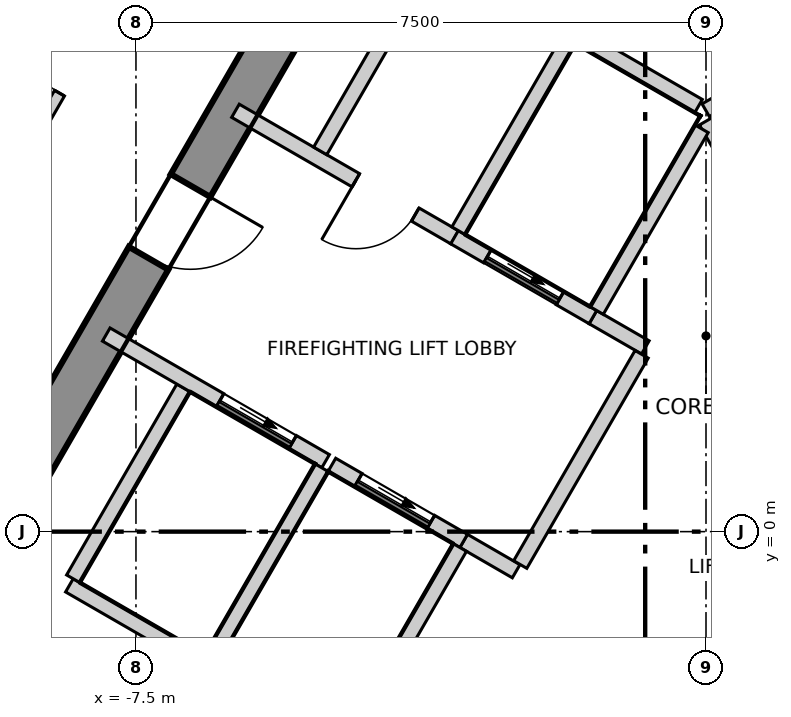
"""IFC4 building model, lengths in metres.
Left out: names, types, materials, properties, quantities, classifications, styles, units other than length and angle.
Written with IfcOpenShell. Run it as: python <this file> out.ifc"""

import sys

from ifc_helpers import new_model, si_unit, direction, frame, frame_2d, origin, place, context, subcontext, project, spatial, polyline, rectangle, outline, extrude, element, fill, save


model = new_model("IFC4")
c1 = context("Model", 3, precision=1e-05, world=origin(), true_north=direction((0.0, 1.0)))
c2 = subcontext(c1, "Body", "Model", "MODEL_VIEW")
j1 = project(units=[si_unit("LENGTHUNIT", "METRE"), si_unit("PLANEANGLEUNIT", "RADIAN")], contexts=[c1])
p1 = place(None, origin())
s1 = spatial("IfcSite", under=j1, at=p1, CompositionType="ELEMENT")
p2 = place(p1, origin())
s2 = spatial("IfcBuilding", under=s1, at=p2, CompositionType="ELEMENT")
p3 = place(p2, frame((0.0, 0.0, 289.9)))
s3 = spatial("IfcBuildingStorey", under=s2, at=p3, CompositionType="ELEMENT", Elevation=289.9)
p4 = place(p3, frame((-1.732, 13.3, -0.3), z_axis=(0.0, 0.0, 1.0), x_axis=(-0.500000539815, -0.866025092122, 0.0)))
e1 = element("IfcWall", 1, at=p4, inside=s3, PredefinedType="SHEAR", context=c2, shape_type="SweptSolid", body=[
    extrude(outline(polyline([(-0.173, -0.3), (1.795, -0.3), (3.763, -0.3), (5.732, -0.3), (7.7, -0.3), (9.668, -0.301), (11.637, -0.301), (13.605, -0.301), (15.573, -0.301), (17.542, -0.301), (19.51, -0.301), (21.478, -0.301), (21.131, 0.3), (19.226, 0.3), (17.321, 0.3), (15.415, 0.3), (13.51, 0.3), (11.605, 0.3), (9.699, 0.3), (7.794, 0.3), (5.889, 0.3), (3.984, 0.3), (2.078, 0.3), (0.173, 0.3), (-0.173, -0.3)])), origin(), (0.0, 0.0, 1.0), 3.6),
])
p5 = place(p4, frame((10.102, 0.0, 0.3)))
e2 = element("IfcOpeningElement", 2, at=p5, cuts=e1, PredefinedType="OPENING", context=c2, shape_type="SweptSolid", body=[
    extrude(rectangle(XDim=1.1, YDim=2.1, at=frame_2d((0.55, 1.05))), frame((0.0, 0.31, 0.0), z_axis=(0.0, -1.0, 0.0), x_axis=(1.0, 0.0, 0.0)), (0.0, 0.0, 1.0), 0.621),
])
p6 = place(p4, frame((16.328, 0.0, 0.3)))
e3 = element("IfcOpeningElement", 3, at=p6, cuts=e1, PredefinedType="OPENING", context=c2, shape_type="SweptSolid", body=[
    extrude(rectangle(XDim=1.0, YDim=2.1, at=frame_2d((0.5, 1.05))), frame((0.0, 0.31, 0.0), z_axis=(0.0, -1.0, 0.0), x_axis=(1.0, 0.0, 0.0)), (0.0, 0.0, 1.0), 0.621),
])
p7 = place(p4, frame((4.777, 0.0, 0.3)))
e4 = element("IfcOpeningElement", 4, at=p7, cuts=e1, PredefinedType="OPENING", context=c2, shape_type="SweptSolid", body=[
    extrude(rectangle(XDim=0.9, YDim=2.1, at=frame_2d((0.45, 1.05))), frame((0.0, 0.31, 0.0), z_axis=(0.0, -1.0, 0.0), x_axis=(1.0, 0.0, 0.0)), (0.0, 0.0, 1.0), 0.621),
])
p8 = place(p3, frame((-2.494, 27.86, 0.0), z_axis=(0.0, 0.0, 1.0), x_axis=(-0.500008134474, -0.866020707292, 0.0)))
e5 = element("IfcWall", 5, at=p8, inside=s3, PredefinedType="ELEMENTEDWALL", context=c2, shape_type="SweptSolid", body=[
    extrude(rectangle(XDim=45.741, YDim=0.2, at=frame_2d((22.871, 0.0))), origin(), (0.0, 0.0, 1.0), 3.3),
])
p9 = place(p8, frame((2.15, 0.0, 0.9)))
e6 = element("IfcOpeningElement", 6, at=p9, cuts=e5, PredefinedType="OPENING", context=c2, shape_type="SweptSolid", body=[
    extrude(rectangle(XDim=3.7, YDim=2.2, at=frame_2d((1.85, 1.1))), frame((0.0, 0.11, 0.0), z_axis=(0.0, -1.0, 0.0), x_axis=(1.0, 0.0, 0.0)), (0.0, 0.0, 1.0), 0.22),
])
p10 = place(p8, frame((7.544, 0.0, 0.9)))
e7 = element("IfcOpeningElement", 7, at=p10, cuts=e5, PredefinedType="OPENING", context=c2, shape_type="SweptSolid", body=[
    extrude(rectangle(XDim=3.7, YDim=2.2, at=frame_2d((1.85, 1.1))), frame((0.0, 0.11, 0.0), z_axis=(0.0, -1.0, 0.0), x_axis=(1.0, 0.0, 0.0)), (0.0, 0.0, 1.0), 0.22),
])
p11 = place(p8, frame((12.939, 0.0, 0.9)))
e8 = element("IfcOpeningElement", 8, at=p11, cuts=e5, PredefinedType="OPENING", context=c2, shape_type="SweptSolid", body=[
    extrude(rectangle(XDim=3.7, YDim=2.2, at=frame_2d((1.85, 1.1))), frame((0.0, 0.11, 0.0), z_axis=(0.0, -1.0, 0.0), x_axis=(1.0, 0.0, 0.0)), (0.0, 0.0, 1.0), 0.22),
])
p12 = place(p8, frame((18.333, 0.0, 0.9)))
e9 = element("IfcOpeningElement", 9, at=p12, cuts=e5, PredefinedType="OPENING", context=c2, shape_type="SweptSolid", body=[
    extrude(rectangle(XDim=3.7, YDim=2.2, at=frame_2d((1.85, 1.1))), frame((0.0, 0.11, 0.0), z_axis=(0.0, -1.0, 0.0), x_axis=(1.0, 0.0, 0.0)), (0.0, 0.0, 1.0), 0.22),
])
p13 = place(p8, frame((23.728, 0.0, 0.9)))
e10 = element("IfcOpeningElement", 10, at=p13, cuts=e5, PredefinedType="OPENING", context=c2, shape_type="SweptSolid", body=[
    extrude(rectangle(XDim=3.7, YDim=2.2, at=frame_2d((1.85, 1.1))), frame((0.0, 0.11, 0.0), z_axis=(0.0, -1.0, 0.0), x_axis=(1.0, 0.0, 0.0)), (0.0, 0.0, 1.0), 0.22),
])
p14 = place(p8, frame((29.122, 0.0, 0.9)))
e11 = element("IfcOpeningElement", 11, at=p14, cuts=e5, PredefinedType="OPENING", context=c2, shape_type="SweptSolid", body=[
    extrude(rectangle(XDim=3.7, YDim=2.2, at=frame_2d((1.85, 1.1))), frame((0.0, 0.11, 0.0), z_axis=(0.0, -1.0, 0.0), x_axis=(1.0, 0.0, 0.0)), (0.0, 0.0, 1.0), 0.22),
])
p15 = place(p8, frame((34.517, 0.0, 0.9)))
e12 = element("IfcOpeningElement", 12, at=p15, cuts=e5, PredefinedType="OPENING", context=c2, shape_type="SweptSolid", body=[
    extrude(rectangle(XDim=3.7, YDim=2.2, at=frame_2d((1.85, 1.1))), frame((0.0, 0.11, 0.0), z_axis=(0.0, -1.0, 0.0), x_axis=(1.0, 0.0, 0.0)), (0.0, 0.0, 1.0), 0.22),
])
p16 = place(p8, frame((39.911, 0.0, 0.9)))
e13 = element("IfcOpeningElement", 13, at=p16, cuts=e5, PredefinedType="OPENING", context=c2, shape_type="SweptSolid", body=[
    extrude(rectangle(XDim=3.7, YDim=2.2, at=frame_2d((1.85, 1.1))), frame((0.0, 0.11, 0.0), z_axis=(0.0, -1.0, 0.0), x_axis=(1.0, 0.0, 0.0)), (0.0, 0.0, 1.0), 0.22),
])
p17 = place(p3, frame((-17.679, -10.12, 0.0), z_axis=(0.0, 0.0, 1.0), x_axis=(0.500008955215, 0.866020233427, 0.0)))
e14 = element("IfcWall", 14, at=p17, inside=s3, PredefinedType="PARTITIONING", context=c2, shape_type="SweptSolid", body=[
    extrude(rectangle(XDim=35.357, YDim=0.15, at=frame_2d((17.679, 0.0))), origin(), (0.0, 0.0, 1.0), 3.3),
])
p18 = place(p17, frame((31.407, 0.0, 0.0)))
e15 = element("IfcOpeningElement", 15, at=p18, cuts=e14, PredefinedType="OPENING", context=c2, shape_type="SweptSolid", body=[
    extrude(rectangle(XDim=1.0, YDim=2.1, at=frame_2d((0.5, 1.05))), frame((0.0, 0.085, 0.0), z_axis=(0.0, -1.0, 0.0), x_axis=(1.0, 0.0, 0.0)), (0.0, 0.0, 1.0), 0.17),
])
p19 = place(p17, frame((25.642, 0.0, 0.0)))
e16 = element("IfcOpeningElement", 16, at=p19, cuts=e14, PredefinedType="OPENING", context=c2, shape_type="SweptSolid", body=[
    extrude(rectangle(XDim=1.0, YDim=2.1, at=frame_2d((0.5, 1.05))), frame((0.0, 0.085, 0.0), z_axis=(0.0, -1.0, 0.0), x_axis=(1.0, 0.0, 0.0)), (0.0, 0.0, 1.0), 0.17),
])
p20 = place(p17, frame((18.348, 0.0, 0.0)))
e17 = element("IfcOpeningElement", 17, at=p20, cuts=e14, PredefinedType="OPENING", context=c2, shape_type="SweptSolid", body=[
    extrude(rectangle(XDim=1.0, YDim=2.1, at=frame_2d((0.5, 1.05))), frame((0.0, 0.085, 0.0), z_axis=(0.0, -1.0, 0.0), x_axis=(1.0, 0.0, 0.0)), (0.0, 0.0, 1.0), 0.17),
])
p21 = place(p17, frame((13.254, 0.0, 0.0)))
e18 = element("IfcOpeningElement", 18, at=p21, cuts=e14, PredefinedType="OPENING", context=c2, shape_type="SweptSolid", body=[
    extrude(rectangle(XDim=1.0, YDim=2.1, at=frame_2d((0.5, 1.05))), frame((0.0, 0.085, 0.0), z_axis=(0.0, -1.0, 0.0), x_axis=(1.0, 0.0, 0.0)), (0.0, 0.0, 1.0), 0.17),
])
p22 = place(p17, frame((7.559, 0.0, 0.0)))
e19 = element("IfcOpeningElement", 19, at=p22, cuts=e14, PredefinedType="OPENING", context=c2, shape_type="SweptSolid", body=[
    extrude(rectangle(XDim=1.0, YDim=2.1, at=frame_2d((0.5, 1.05))), frame((0.0, 0.085, 0.0), z_axis=(0.0, -1.0, 0.0), x_axis=(1.0, 0.0, 0.0)), (0.0, 0.0, 1.0), 0.17),
])
p23 = place(p17, frame((2.865, 0.0, 0.0)))
e20 = element("IfcOpeningElement", 20, at=p23, cuts=e14, PredefinedType="OPENING", context=c2, shape_type="SweptSolid", body=[
    extrude(rectangle(XDim=1.0, YDim=2.1, at=frame_2d((0.5, 1.05))), frame((0.0, 0.085, 0.0), z_axis=(0.0, -1.0, 0.0), x_axis=(1.0, 0.0, 0.0)), (0.0, 0.0, 1.0), 0.17),
])
p24 = place(p3, frame((0.075, 20.37, 0.0), z_axis=(0.0, 0.0, 1.0), x_axis=(0.500009775255, -0.866019759965, 0.0)))
e21 = element("IfcWall", 21, at=p24, inside=s3, PredefinedType="PARTITIONING", context=c2, shape_type="SweptSolid", body=[
    extrude(rectangle(XDim=35.207, YDim=0.15, at=frame_2d((17.604, 0.0))), origin(), (0.0, 0.0, 1.0), 3.3),
])
p25 = place(p24, frame((31.407, 0.0, 0.0)))
e22 = element("IfcOpeningElement", 22, at=p25, cuts=e21, PredefinedType="OPENING", context=c2, shape_type="SweptSolid", body=[
    extrude(rectangle(XDim=1.0, YDim=2.1, at=frame_2d((0.5, 1.05))), frame((0.0, 0.085, 0.0), z_axis=(0.0, -1.0, 0.0), x_axis=(1.0, 0.0, 0.0)), (0.0, 0.0, 1.0), 0.17),
])
p26 = place(p24, frame((19.243, 0.0, 0.0)))
e23 = element("IfcOpeningElement", 23, at=p26, cuts=e21, PredefinedType="OPENING", context=c2, shape_type="SweptSolid", body=[
    extrude(rectangle(XDim=1.0, YDim=2.1, at=frame_2d((0.5, 1.05))), frame((0.0, 0.085, 0.0), z_axis=(0.0, -1.0, 0.0), x_axis=(1.0, 0.0, 0.0)), (0.0, 0.0, 1.0), 0.17),
])
p27 = place(p24, frame((24.543, 0.0, 0.0)))
e24 = element("IfcOpeningElement", 24, at=p27, cuts=e21, PredefinedType="OPENING", context=c2, shape_type="SweptSolid", body=[
    extrude(rectangle(XDim=0.9, YDim=2.1, at=frame_2d((0.45, 1.05))), frame((0.0, 0.085, 0.0), z_axis=(0.0, -1.0, 0.0), x_axis=(1.0, 0.0, 0.0)), (0.0, 0.0, 1.0), 0.17),
])
p28 = place(p24, frame((22.443, 0.0, 0.0)))
e25 = element("IfcOpeningElement", 25, at=p28, cuts=e21, PredefinedType="OPENING", context=c2, shape_type="SweptSolid", body=[
    extrude(rectangle(XDim=0.9, YDim=2.1, at=frame_2d((0.45, 1.05))), frame((0.0, 0.085, 0.0), z_axis=(0.0, -1.0, 0.0), x_axis=(1.0, 0.0, 0.0)), (0.0, 0.0, 1.0), 0.17),
])
p29 = place(p24, frame((13.253, 0.0, 0.0)))
e26 = element("IfcOpeningElement", 26, at=p29, cuts=e21, PredefinedType="OPENING", context=c2, shape_type="SweptSolid", body=[
    extrude(rectangle(XDim=1.0, YDim=2.1, at=frame_2d((0.5, 1.05))), frame((0.0, 0.085, 0.0), z_axis=(0.0, -1.0, 0.0), x_axis=(1.0, 0.0, 0.0)), (0.0, 0.0, 1.0), 0.17),
])
p30 = place(p24, frame((5.559, 0.0, 0.0)))
e27 = element("IfcOpeningElement", 27, at=p30, cuts=e21, PredefinedType="OPENING", context=c2, shape_type="SweptSolid", body=[
    extrude(rectangle(XDim=1.0, YDim=2.1, at=frame_2d((0.5, 1.05))), frame((0.0, 0.085, 0.0), z_axis=(0.0, -1.0, 0.0), x_axis=(1.0, 0.0, 0.0)), (0.0, 0.0, 1.0), 0.17),
])
p31 = place(p3, frame((-8.376, -0.707, 0.0), z_axis=(0.0, 0.0, 1.0), x_axis=(0.866067520717, -0.499927044236, 0.0)))
e28 = element("IfcWall", 28, at=p31, inside=s3, PredefinedType="SOLIDWALL", context=c2, shape_type="SweptSolid", body=[
    extrude(rectangle(XDim=2.1, YDim=0.2, at=frame_2d((1.05, 0.0))), origin(), (0.0, 0.0, 1.0), 3.3),
])
p32 = place(p3, frame((-8.326, -0.62, 0.0), z_axis=(0.0, 0.0, 1.0), x_axis=(0.500023687443, 0.866011727401, 0.0)))
e29 = element("IfcWall", 29, at=p32, inside=s3, PredefinedType="SOLIDWALL", context=c2, shape_type="SweptSolid", body=[
    extrude(rectangle(XDim=2.9, YDim=0.2, at=frame_2d((1.45, 0.0))), origin(), (0.0, 0.0, 1.0), 3.3),
])
p33 = place(p3, frame((-0.002, 5.541, 0.0), z_axis=(0.0, 0.0, 1.0), x_axis=(0.86600155993, 0.500041296494, 0.0)))
e30 = element("IfcWall", 30, at=p33, inside=s3, PredefinedType="SOLIDWALL", context=c2, shape_type="SweptSolid", body=[
    extrude(rectangle(XDim=4.132, YDim=0.2, at=frame_2d((2.066, 0.0))), origin(), (0.0, 0.0, 1.0), 3.3),
])
p34 = place(p3, frame((0.0, 5.4, 0.0), z_axis=(0.0, 0.0, 1.0), x_axis=(0.500103862429, -0.865965430478, 0.0)))
e31 = element("IfcWall", 31, at=p34, inside=s3, PredefinedType="SOLIDWALL", context=c2, shape_type="SweptSolid", body=[
    extrude(rectangle(XDim=2.973, YDim=0.2, at=frame_2d((1.487, 0.0))), origin(), (0.0, 0.0, 1.0), 3.3),
])
p35 = place(p34, frame((0.937, 0.0, 0.0)))
e32 = element("IfcOpeningElement", 32, at=p35, cuts=e31, PredefinedType="OPENING", context=c2, shape_type="SweptSolid", body=[
    extrude(rectangle(XDim=1.1, YDim=2.1, at=frame_2d((0.55, 1.05))), frame((0.0, 0.11, 0.0), z_axis=(0.0, -1.0, 0.0), x_axis=(1.0, 0.0, 0.0)), (0.0, 0.0, 1.0), 0.22),
])
p36 = place(p3, frame((-7.891, 2.593, 0.0), z_axis=(0.0, 0.0, 1.0), x_axis=(0.866070917804, -0.499921159118, 0.0)))
e33 = element("IfcWall", 33, at=p36, inside=s3, PredefinedType="SOLIDWALL", context=c2, shape_type="SweptSolid", body=[
    extrude(rectangle(XDim=3.333, YDim=0.2, at=frame_2d((1.666, 0.0))), origin(), (0.0, 0.0, 1.0), 3.3),
])
p37 = place(p36, frame((1.73, 0.0, 0.0)))
e34 = element("IfcOpeningElement", 34, at=p37, cuts=e33, PredefinedType="OPENING", context=c2, shape_type="SweptSolid", body=[
    extrude(rectangle(XDim=1.1, YDim=2.1, at=frame_2d((0.55, 1.05))), frame((0.0, 0.11, 0.0), z_axis=(0.0, -1.0, 0.0), x_axis=(1.0, 0.0, 0.0)), (0.0, 0.0, 1.0), 0.22),
])
p38 = place(p3, frame((-3.188, -0.122, 0.0), z_axis=(0.0, 0.0, 1.0), x_axis=(0.865705793592, -0.50055317294, 0.0)))
e35 = element("IfcWall", 35, at=p38, inside=s3, PredefinedType="SOLIDWALL", context=c2, shape_type="SweptSolid", body=[
    extrude(rectangle(XDim=0.797, YDim=0.2, at=frame_2d((0.398, 0.0))), origin(), (0.0, 0.0, 1.0), 3.3),
])
p39 = place(p3, frame((-6.191, 5.537, 0.0), z_axis=(0.0, 0.0, 1.0), x_axis=(0.866052607023, -0.499952879648, 0.0)))
e36 = element("IfcWall", 36, at=p39, inside=s3, PredefinedType="SOLIDWALL", context=c2, shape_type="SweptSolid", body=[
    extrude(rectangle(XDim=3.332, YDim=0.2, at=frame_2d((1.666, 0.0))), origin(), (0.0, 0.0, 1.0), 3.3),
])
p40 = place(p39, frame((1.83, 0.0, 0.0)))
e37 = element("IfcOpeningElement", 37, at=p40, cuts=e36, PredefinedType="OPENING", context=c2, shape_type="SweptSolid", body=[
    extrude(rectangle(XDim=0.9, YDim=2.1, at=frame_2d((0.45, 1.05))), frame((0.0, 0.11, 0.0), z_axis=(0.0, -1.0, 0.0), x_axis=(1.0, 0.0, 0.0)), (0.0, 0.0, 1.0), 0.22),
])
p41 = place(p3, frame((-1.488, 2.822, 0.0), z_axis=(0.0, 0.0, 1.0), x_axis=(0.866236612152, -0.499633997809, 0.0)))
e38 = element("IfcWall", 38, at=p41, inside=s3, PredefinedType="SOLIDWALL", context=c2, shape_type="SweptSolid", body=[
    extrude(rectangle(XDim=0.796, YDim=0.2, at=frame_2d((0.398, 0.0))), origin(), (0.0, 0.0, 1.0), 3.3),
])
p42 = place(p3, frame((-5.076, 5.009, 0.0), z_axis=(0.0, 0.0, 1.0), x_axis=(0.50002537861, 0.866010750942, 0.0)))
e39 = element("IfcWall", 39, at=p42, inside=s3, PredefinedType="SOLIDWALL", context=c2, shape_type="SweptSolid", body=[
    extrude(rectangle(XDim=3.0, YDim=0.2, at=frame_2d((1.5, 0.0))), origin(), (0.0, 0.0, 1.0), 3.3),
])
p43 = place(p3, frame((-2.444, -0.433, 0.0), z_axis=(0.0, 0.0, 1.0), x_axis=(0.500035624827, 0.866004834804, 0.0)))
e40 = element("IfcWall", 40, at=p43, inside=s3, PredefinedType="SOLIDWALL", context=c2, shape_type="SweptSolid", body=[
    extrude(rectangle(XDim=3.194, YDim=0.2, at=frame_2d((1.597, 0.0))), origin(), (0.0, 0.0, 1.0), 3.3),
])
p44 = place(p3, frame((-6.507, -1.67, 0.0), z_axis=(0.0, 0.0, 1.0), x_axis=(0.50012328804, 0.865954211699, 0.0)))
e41 = element("IfcWall", 41, at=p44, inside=s3, PredefinedType="SOLIDWALL", context=c2, shape_type="SweptSolid", body=[
    extrude(rectangle(XDim=2.9, YDim=0.2, at=frame_2d((1.45, 0.0))), origin(), (0.0, 0.0, 1.0), 3.3),
])
p45 = place(p3, frame((-4.922, 0.879, 0.0), z_axis=(0.0, 0.0, 1.0), x_axis=(0.866073918653, -0.499915960366, 0.0)))
e42 = element("IfcWall", 42, at=p45, inside=s3, PredefinedType="SOLIDWALL", context=c2, shape_type="SweptSolid", body=[
    extrude(rectangle(XDim=2.002, YDim=0.2, at=frame_2d((1.001, 0.0))), origin(), (0.0, 0.0, 1.0), 3.3),
])
p46 = place(p45, frame((0.402, 0.0, 0.0)))
e43 = element("IfcOpeningElement", 43, at=p46, cuts=e42, PredefinedType="OPENING", context=c2, shape_type="SweptSolid", body=[
    extrude(rectangle(XDim=1.1, YDim=2.1, at=frame_2d((0.55, 1.05))), frame((0.0, 0.11, 0.0), z_axis=(0.0, -1.0, 0.0), x_axis=(1.0, 0.0, 0.0)), (0.0, 0.0, 1.0), 0.22),
])
p47 = place(p3, frame((-4.619, -2.6, 0.0), z_axis=(0.0, 0.0, 1.0), x_axis=(0.50009492287, 0.865970593103, 0.0)))
e44 = element("IfcWall", 44, at=p47, inside=s3, PredefinedType="SOLIDWALL", context=c2, shape_type="SweptSolid", body=[
    extrude(rectangle(XDim=2.761, YDim=0.2, at=frame_2d((1.381, 0.0))), origin(), (0.0, 0.0, 1.0), 3.3),
])
p48 = place(p3, frame((-3.309, 3.873, 0.0), z_axis=(0.0, 0.0, 1.0), x_axis=(0.866098583652, -0.499873227325, 0.0)))
e45 = element("IfcWall", 45, at=p48, inside=s3, PredefinedType="SOLIDWALL", context=c2, shape_type="SweptSolid", body=[
    extrude(rectangle(XDim=2.103, YDim=0.2, at=frame_2d((1.051, 0.0))), origin(), (0.0, 0.0, 1.0), 3.3),
])
p49 = place(p48, frame((0.502, 0.0, 0.0)))
e46 = element("IfcOpeningElement", 46, at=p49, cuts=e45, PredefinedType="OPENING", context=c2, shape_type="SweptSolid", body=[
    extrude(rectangle(XDim=1.1, YDim=2.1, at=frame_2d((0.55, 1.05))), frame((0.0, 0.11, 0.0), z_axis=(0.0, -1.0, 0.0), x_axis=(1.0, 0.0, 0.0)), (0.0, 0.0, 1.0), 0.22),
])
p50 = place(p3, frame((-3.257, 3.959, 0.0), z_axis=(0.0, 0.0, 1.0), x_axis=(0.50012328804, 0.865954211699, 0.0)))
e47 = element("IfcWall", 47, at=p50, inside=s3, PredefinedType="SOLIDWALL", context=c2, shape_type="SweptSolid", body=[
    extrude(rectangle(XDim=2.9, YDim=0.2, at=frame_2d((1.45, 0.0))), origin(), (0.0, 0.0, 1.0), 3.3),
])
p51 = place(p3, frame((-1.67, 6.507, 0.0), z_axis=(0.0, 0.0, 1.0), x_axis=(0.865941441609, -0.500145398563, 0.0)))
e48 = element("IfcWall", 48, at=p51, inside=s3, PredefinedType="SOLIDWALL", context=c2, shape_type="SweptSolid", body=[
    extrude(rectangle(XDim=1.815, YDim=0.2, at=frame_2d((0.908, 0.0))), origin(), (0.0, 0.0, 1.0), 3.3),
])
p52 = place(p3, frame((-1.438, 2.909, 0.0), z_axis=(0.0, 0.0, 1.0), x_axis=(0.499829630636, 0.866123744241, 0.0)))
e49 = element("IfcWall", 49, at=p52, inside=s3, PredefinedType="SOLIDWALL", context=c2, shape_type="SweptSolid", body=[
    extrude(rectangle(XDim=2.761, YDim=0.2, at=frame_2d((1.38, 0.0))), origin(), (0.0, 0.0, 1.0), 3.3),
])
p53 = place(p46, origin())
e50 = element("IfcDoor", 50, at=p53, inside=s3, OperationType="SLIDING_TO_LEFT", PredefinedType="DOOR", context=c2, shape_type="SweptSolid", body=[
    extrude(rectangle(XDim=1.1, YDim=2.1, at=frame_2d((0.55, 1.05))), frame((0.0, 0.025, 0.0), z_axis=(0.0, -1.0, 0.0), x_axis=(1.0, 0.0, 0.0)), (0.0, 0.0, 1.0), 0.05),
])
fill(e43, e50)
p54 = place(p49, origin())
e51 = element("IfcDoor", 51, at=p54, inside=s3, OperationType="SLIDING_TO_LEFT", PredefinedType="DOOR", context=c2, shape_type="SweptSolid", body=[
    extrude(rectangle(XDim=1.1, YDim=2.1, at=frame_2d((0.55, 1.05))), frame((0.0, 0.025, 0.0), z_axis=(0.0, -1.0, 0.0), x_axis=(1.0, 0.0, 0.0)), (0.0, 0.0, 1.0), 0.05),
])
fill(e46, e51)
p55 = place(p37, origin())
e52 = element("IfcDoor", 52, at=p55, inside=s3, OperationType="SLIDING_TO_LEFT", PredefinedType="DOOR", context=c2, shape_type="SweptSolid", body=[
    extrude(rectangle(XDim=1.1, YDim=2.1, at=frame_2d((0.55, 1.05))), frame((0.0, 0.025, 0.0), z_axis=(0.0, -1.0, 0.0), x_axis=(1.0, 0.0, 0.0)), (0.0, 0.0, 1.0), 0.05),
])
fill(e34, e52)
p56 = place(p40, origin())
e53 = element("IfcDoor", 53, at=p56, inside=s3, OperationType="SINGLE_SWING_LEFT", PredefinedType="DOOR", context=c2, shape_type="SweptSolid", body=[
    extrude(rectangle(XDim=0.9, YDim=2.1, at=frame_2d((0.45, 1.05))), frame((0.0, 0.025, 0.0), z_axis=(0.0, -1.0, 0.0), x_axis=(1.0, 0.0, 0.0)), (0.0, 0.0, 1.0), 0.05),
])
fill(e37, e53)
p57 = place(p20, origin())
e54 = element("IfcDoor", 54, at=p57, inside=s3, OperationType="SINGLE_SWING_LEFT", PredefinedType="DOOR", context=c2, shape_type="SweptSolid", body=[
    extrude(rectangle(XDim=1.0, YDim=2.1, at=frame_2d((0.5, 1.05))), frame((0.0, 0.025, 0.0), z_axis=(0.0, -1.0, 0.0), x_axis=(1.0, 0.0, 0.0)), (0.0, 0.0, 1.0), 0.05),
])
fill(e17, e54)
p58 = place(p5, origin())
e55 = element("IfcDoor", 55, at=p58, inside=s3, OperationType="SINGLE_SWING_RIGHT", PredefinedType="DOOR", context=c2, shape_type="SweptSolid", body=[
    extrude(rectangle(XDim=1.1, YDim=2.1, at=frame_2d((0.55, 1.05))), frame((0.0, 0.025, 0.0), z_axis=(0.0, -1.0, 0.0), x_axis=(1.0, 0.0, 0.0)), (0.0, 0.0, 1.0), 0.05),
])
fill(e2, e55)
save(model, sys.argv[1])
